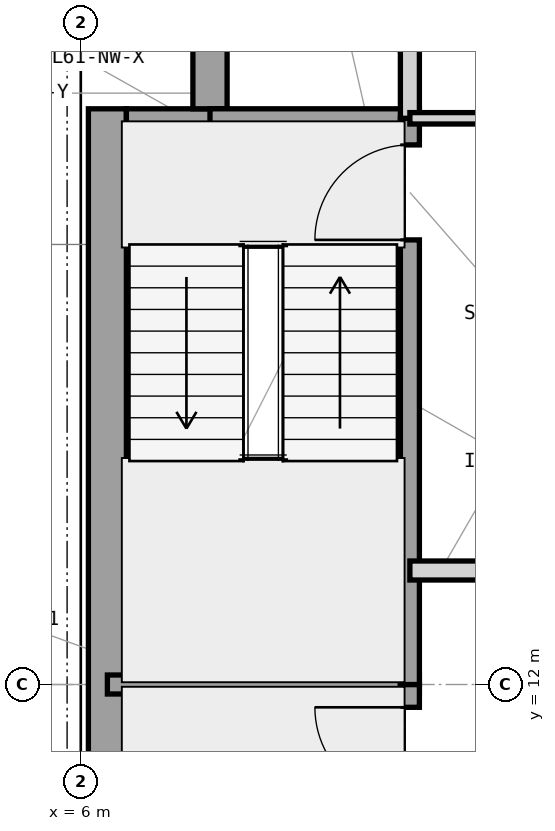
"""IFC4 building model, lengths in metres.
Left out: names, types, materials, properties, quantities, classifications, styles, units other than length and angle.
Written with IfcOpenShell. Run it as: python <this file> out.ifc"""

import sys

from ifc_helpers import new_model, si_unit, direction, frame, frame_2d, origin, place, context, subcontext, project, spatial, rectangle, extrude, element, fill, save


model = new_model("IFC4")
c1 = context("Model", 3, precision=1e-05, world=origin(), true_north=direction((0.0, 1.0)))
c2 = subcontext(c1, "Body", "Model", "MODEL_VIEW")
j1 = project(units=[si_unit("LENGTHUNIT", "METRE"), si_unit("PLANEANGLEUNIT", "RADIAN")], contexts=[c1])
p1 = place(None, origin())
s1 = spatial("IfcSite", under=j1, at=p1, CompositionType="ELEMENT")
p2 = place(p1, origin())
s2 = spatial("IfcBuilding", under=s1, at=p2, CompositionType="ELEMENT")
p3 = place(p2, frame((0.0, 0.0, 250.8)))
s3 = spatial("IfcBuildingStorey", under=s2, at=p3, CompositionType="ELEMENT", Elevation=250.8)
p4 = place(p3, frame((6.35, 4.425, 0.0), z_axis=(0.0, 0.0, 1.0), x_axis=(0.0, 1.0, 0.0)))
e1 = element("IfcWall", 1, at=p4, inside=s3, PredefinedType="SHEAR", context=c2, shape_type="SweptSolid", body=[
    extrude(rectangle(XDim=15.15, YDim=0.5, at=frame_2d((7.575, 0.0))), origin(), (0.0, 0.0, 1.0), 3.9),
])
p5 = place(p3, frame((6.6, 19.35, 0.0), z_axis=(0.0, 0.0, 1.0), x_axis=(1.0, 0.0, 0.0)))
e2 = element("IfcWall", 2, at=p5, inside=s3, PredefinedType="SHEAR", context=c2, shape_type="SweptSolid", body=[
    extrude(rectangle(XDim=1.325, YDim=0.45, at=frame_2d((0.663, 0.0))), origin(), (0.0, 0.0, 1.0), 3.9),
])
p6 = place(p3, frame((7.7, 19.575, 0.0), z_axis=(0.0, 0.0, 1.0), x_axis=(0.0, 1.0, 0.0)))
e3 = element("IfcWall", 3, at=p6, inside=s3, PredefinedType="SHEAR", context=c2, shape_type="SweptSolid", body=[
    extrude(rectangle(XDim=0.825, YDim=0.45, at=frame_2d((0.413, 0.0))), origin(), (0.0, 0.0, 1.0), 3.9),
])
p7 = place(p3, frame((6.35, 12.0, 0.0), z_axis=(0.0, 0.0, 1.0), x_axis=(1.0, 0.0, 0.0)))
e4 = element("IfcWall", 4, at=p7, inside=s3, PredefinedType="SHEAR", context=c2, shape_type="SweptSolid", body=[
    extrude(rectangle(XDim=4.105, YDim=0.25, at=frame_2d((2.052, 0.0))), origin(), (0.0, 0.0, 1.0), 3.9),
])
p8 = place(p3, frame((7.7, 19.45, 0.0), z_axis=(0.0, 0.0, 1.0), x_axis=(1.0, 0.0, 0.0)))
e5 = element("IfcWall", 5, at=p8, inside=s3, PredefinedType="SHEAR", context=c2, shape_type="SweptSolid", body=[
    extrude(rectangle(XDim=2.755, YDim=0.25, at=frame_2d((1.377, 0.0))), origin(), (0.0, 0.0, 1.0), 3.9),
])
p9 = place(p3, frame((10.33, 4.55, 0.0), z_axis=(0.0, 0.0, 1.0), x_axis=(0.0, 1.0, 0.0)))
e6 = element("IfcWall", 6, at=p9, inside=s3, PredefinedType="SHEAR", context=c2, shape_type="SweptSolid", body=[
    extrude(rectangle(XDim=7.45, YDim=0.25, at=frame_2d((3.725, 0.0))), origin(), (0.0, 0.0, 1.0), 3.9),
])
p10 = place(p9, frame((5.9, 0.0, 0.0)))
e7 = element("IfcOpeningElement", 7, at=p10, cuts=e6, PredefinedType="OPENING", context=c2, shape_type="SweptSolid", body=[
    extrude(rectangle(XDim=1.25, YDim=2.2, at=frame_2d((0.625, 1.1))), frame((0.0, 0.135, 0.0), z_axis=(0.0, -1.0, 0.0), x_axis=(1.0, 0.0, 0.0)), (0.0, 0.0, 1.0), 0.27),
])
p11 = place(p3, frame((10.33, 12.0, 0.0), z_axis=(0.0, 0.0, 1.0), x_axis=(0.0, 1.0, 0.0)))
e8 = element("IfcWall", 8, at=p11, inside=s3, PredefinedType="SHEAR", context=c2, shape_type="SweptSolid", body=[
    extrude(rectangle(XDim=7.45, YDim=0.25, at=frame_2d((3.725, 0.0))), origin(), (0.0, 0.0, 1.0), 3.9),
])
p12 = place(p11, frame((5.85, 0.0, 0.0)))
e9 = element("IfcOpeningElement", 9, at=p12, cuts=e8, PredefinedType="OPENING", context=c2, shape_type="SweptSolid", body=[
    extrude(rectangle(XDim=1.25, YDim=2.2, at=frame_2d((0.625, 1.1))), frame((0.0, 0.135, 0.0), z_axis=(0.0, -1.0, 0.0), x_axis=(1.0, 0.0, 0.0)), (0.0, 0.0, 1.0), 0.27),
])
p13 = place(p3, frame((10.33, 19.45, 0.0), z_axis=(0.0, 0.0, 1.0), x_axis=(0.0, 1.0, 0.0)))
e10 = element("IfcWall", 10, at=p13, inside=s3, PredefinedType="PARTITIONING", context=c2, shape_type="SweptSolid", body=[
    extrude(rectangle(XDim=1.2, YDim=0.25, at=frame_2d((0.6, 0.0))), origin(), (0.0, 0.0, 1.0), 3.63),
])
p14 = place(p3, frame((10.33, 13.5, 0.0), z_axis=(0.0, 0.0, 1.0), x_axis=(1.0, 0.0, 0.0)))
e11 = element("IfcWall", 11, at=p14, inside=s3, PredefinedType="PARTITIONING", context=c2, shape_type="SweptSolid", body=[
    extrude(rectangle(XDim=1.62, YDim=0.25, at=frame_2d((0.81, 0.0))), origin(), (0.0, 0.0, 1.0), 3.088),
])
p15 = place(p3, frame((10.33, 19.45, 0.0), z_axis=(0.0, 0.0, 1.0), x_axis=(1.0, 0.0, 0.0)))
e12 = element("IfcWall", 12, at=p15, inside=s3, PredefinedType="PARTITIONING", context=c2, shape_type="SweptSolid", body=[
    extrude(rectangle(XDim=3.82, YDim=0.15, at=frame_2d((1.91, 0.0))), origin(), (0.0, 0.0, 1.0), 3.63),
])
p16 = place(p15, frame((1.25, 0.0, 0.0)))
e13 = element("IfcOpeningElement", 13, at=p16, cuts=e12, PredefinedType="OPENING", context=c2, shape_type="SweptSolid", body=[
    extrude(rectangle(XDim=0.95, YDim=2.1, at=frame_2d((0.475, 1.05))), frame((0.0, 0.085, 0.0), z_axis=(0.0, -1.0, 0.0), x_axis=(1.0, 0.0, 0.0)), (0.0, 0.0, 1.0), 0.17),
])
p17 = place(p10, origin())
e14 = element("IfcDoor", 14, at=p17, inside=s3, OperationType="SINGLE_SWING_RIGHT", PredefinedType="DOOR", context=c2, shape_type="SweptSolid", body=[
    extrude(rectangle(XDim=1.25, YDim=2.2, at=frame_2d((0.625, 1.1))), frame((0.0, 0.025, 0.0), z_axis=(0.0, -1.0, 0.0), x_axis=(1.0, 0.0, 0.0)), (0.0, 0.0, 1.0), 0.05),
])
fill(e7, e14)
p18 = place(p12, origin())
e15 = element("IfcDoor", 15, at=p18, inside=s3, OperationType="SINGLE_SWING_LEFT", PredefinedType="DOOR", context=c2, shape_type="SweptSolid", body=[
    extrude(rectangle(XDim=1.25, YDim=2.2, at=frame_2d((0.625, 1.1))), frame((0.0, 0.025, 0.0), z_axis=(0.0, -1.0, 0.0), x_axis=(1.0, 0.0, 0.0)), (0.0, 0.0, 1.0), 0.05),
])
fill(e9, e15)
save(model, sys.argv[1])
